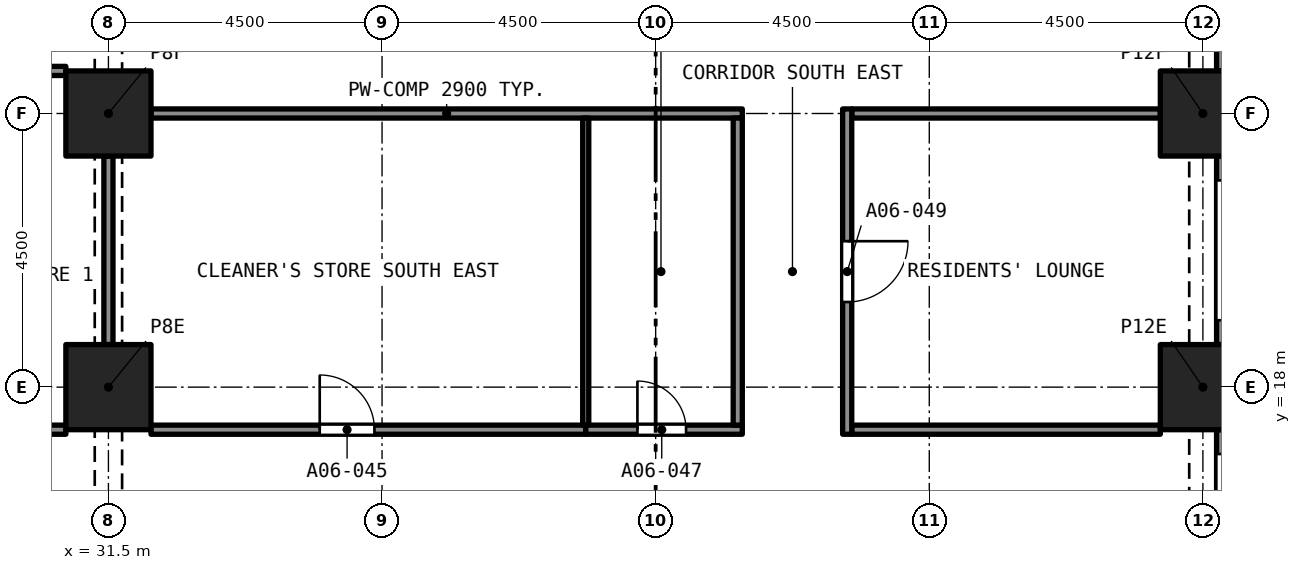
"""IFC4 building model, lengths in metres.
Left out: names, types, materials, properties, quantities, classifications, styles, units other than length and angle.
Written with IfcOpenShell. Run it as: python <this file> out.ifc"""

import sys

from ifc_helpers import new_model, si_unit, direction, frame, frame_2d, origin, origin_2d, place, context, subcontext, project, spatial, rectangle, extrude, element, fill, save


model = new_model("IFC4")
c1 = context("Model", 3, precision=1e-05, world=origin(), true_north=direction((0.0, 1.0)))
c2 = subcontext(c1, "Body", "Model", "MODEL_VIEW")
j1 = project(units=[si_unit("LENGTHUNIT", "METRE"), si_unit("PLANEANGLEUNIT", "RADIAN")], contexts=[c1])
p1 = place(None, origin())
s1 = spatial("IfcSite", under=j1, at=p1, CompositionType="ELEMENT")
p2 = place(p1, origin())
s2 = spatial("IfcBuilding", under=s1, at=p2, CompositionType="ELEMENT")
p3 = place(p2, frame((0.0, 0.0, 30.4)))
s3 = spatial("IfcBuildingStorey", under=s2, at=p3, CompositionType="ELEMENT", Elevation=30.4)
for number, where, z_axis, x_axis in (
    (1, (31.5, 18.0, 0.0), (0.0, 0.0, 1.0), (1.0, 0.0, 0.0)),
    (2, (49.5, 18.0, 0.0), (0.0, 0.0, 1.0), (1.0, 0.0, 0.0)),
    (3, (31.5, 22.5, 0.0), (0.0, 0.0, 1.0), (1.0, 0.0, 0.0)),
    (4, (49.5, 22.5, 0.0), (0.0, 0.0, 1.0), (1.0, 0.0, 0.0)),
):
    element("IfcColumn", number, at=place(p3, frame(where, z_axis=z_axis, x_axis=x_axis)), inside=s3, PredefinedType="COLUMN", context=c2, shape_type="SweptSolid", body=[
        extrude(rectangle(XDim=1.4, YDim=1.4, at=origin_2d()), origin(), (0.0, 0.0, 1.0), 3.2),
    ])
p4 = place(p3, frame((49.875, 17.3, 0.0), z_axis=(0.0, 0.0, 1.0), x_axis=(0.0, -1.0, 0.0)))
e5 = element("IfcWall", 5, at=p4, inside=s3, PredefinedType="SOLIDWALL", context=c2, shape_type="SweptSolid", body=[
    extrude(rectangle(XDim=3.1, YDim=0.3, at=frame_2d((1.55, 0.0))), origin(), (0.0, 0.0, 1.0), 3.2),
])
p5 = place(p4, frame((0.4, 0.0, 0.45)))
e6 = element("IfcOpeningElement", 6, at=p5, cuts=e5, PredefinedType="OPENING", context=c2, shape_type="SweptSolid", body=[
    extrude(rectangle(XDim=2.3, YDim=1.95, at=frame_2d((1.15, 0.975))), frame((0.0, 0.16, 0.0), z_axis=(0.0, -1.0, 0.0), x_axis=(1.0, 0.0, 0.0)), (0.0, 0.0, 1.0), 0.32),
])
p6 = place(p3, frame((49.875, 21.8, 0.0), z_axis=(0.0, 0.0, 1.0), x_axis=(0.0, -1.0, 0.0)))
e7 = element("IfcWall", 7, at=p6, inside=s3, PredefinedType="SOLIDWALL", context=c2, shape_type="SweptSolid", body=[
    extrude(rectangle(XDim=3.1, YDim=0.3, at=frame_2d((1.55, 0.0))), origin(), (0.0, 0.0, 1.0), 3.2),
])
p7 = place(p6, frame((0.4, 0.0, 0.45)))
e8 = element("IfcOpeningElement", 8, at=p7, cuts=e7, PredefinedType="OPENING", context=c2, shape_type="SweptSolid", body=[
    extrude(rectangle(XDim=2.3, YDim=1.95, at=frame_2d((1.15, 0.975))), frame((0.0, 0.16, 0.0), z_axis=(0.0, -1.0, 0.0), x_axis=(1.0, 0.0, 0.0)), (0.0, 0.0, 1.0), 0.32),
])
p8 = place(p3, frame((49.875, 26.3, 0.0), z_axis=(0.0, 0.0, 1.0), x_axis=(0.0, -1.0, 0.0)))
e9 = element("IfcWall", 9, at=p8, inside=s3, PredefinedType="SOLIDWALL", context=c2, shape_type="SweptSolid", body=[
    extrude(rectangle(XDim=3.1, YDim=0.3, at=frame_2d((1.55, 0.0))), origin(), (0.0, 0.0, 1.0), 3.2),
])
p9 = place(p8, frame((0.4, 0.0, 0.45)))
e10 = element("IfcOpeningElement", 10, at=p9, cuts=e9, PredefinedType="OPENING", context=c2, shape_type="SweptSolid", body=[
    extrude(rectangle(XDim=2.3, YDim=1.95, at=frame_2d((1.15, 0.975))), frame((0.0, 0.16, 0.0), z_axis=(0.0, -1.0, 0.0), x_axis=(1.0, 0.0, 0.0)), (0.0, 0.0, 1.0), 0.32),
])
p10 = place(p3, frame((25.725, 17.3, 0.0), z_axis=(0.0, 0.0, 1.0), x_axis=(1.0, 0.0, 0.0)))
e11 = element("IfcWall", 11, at=p10, inside=s3, PredefinedType="PARTITIONING", context=c2, shape_type="SweptSolid", body=[
    extrude(rectangle(XDim=5.075, YDim=0.15, at=frame_2d((2.538, 0.0))), origin(), (0.0, 0.0, 1.0), 2.75),
])
p11 = place(p3, frame((32.2, 17.3, 0.0), z_axis=(0.0, 0.0, 1.0), x_axis=(1.0, 0.0, 0.0)))
e12 = element("IfcWall", 12, at=p11, inside=s3, PredefinedType="PARTITIONING", context=c2, shape_type="SweptSolid", body=[
    extrude(rectangle(XDim=7.15, YDim=0.15, at=frame_2d((3.575, 0.0))), origin(), (0.0, 0.0, 1.0), 2.9),
])
p12 = place(p11, frame((2.775, 0.0, 0.0)))
e13 = element("IfcOpeningElement", 13, at=p12, cuts=e12, PredefinedType="OPENING", context=c2, shape_type="SweptSolid", body=[
    extrude(rectangle(XDim=0.9, YDim=2.1, at=frame_2d((0.45, 1.05))), frame((0.0, 0.085, 0.0), z_axis=(0.0, -1.0, 0.0), x_axis=(1.0, 0.0, 0.0)), (0.0, 0.0, 1.0), 0.17),
])
p13 = place(p3, frame((39.35, 17.3, 0.0), z_axis=(0.0, 0.0, 1.0), x_axis=(1.0, 0.0, 0.0)))
e14 = element("IfcWall", 14, at=p13, inside=s3, PredefinedType="PARTITIONING", context=c2, shape_type="SweptSolid", body=[
    extrude(rectangle(XDim=2.575, YDim=0.15, at=frame_2d((1.288, 0.0))), origin(), (0.0, 0.0, 1.0), 2.9),
])
p14 = place(p13, frame((0.85, 0.0, 0.0)))
e15 = element("IfcOpeningElement", 15, at=p14, cuts=e14, PredefinedType="OPENING", context=c2, shape_type="SweptSolid", body=[
    extrude(rectangle(XDim=0.8, YDim=2.1, at=frame_2d((0.4, 1.05))), frame((0.0, 0.085, 0.0), z_axis=(0.0, -1.0, 0.0), x_axis=(1.0, 0.0, 0.0)), (0.0, 0.0, 1.0), 0.17),
])
p15 = place(p3, frame((43.725, 17.3, 0.0), z_axis=(0.0, 0.0, 1.0), x_axis=(1.0, 0.0, 0.0)))
e16 = element("IfcWall", 16, at=p15, inside=s3, PredefinedType="PARTITIONING", context=c2, shape_type="SweptSolid", body=[
    extrude(rectangle(XDim=5.075, YDim=0.15, at=frame_2d((2.538, 0.0))), origin(), (0.0, 0.0, 1.0), 2.9),
])
p16 = place(p3, frame((25.725, 23.2, 0.0), z_axis=(0.0, 0.0, 1.0), x_axis=(1.0, 0.0, 0.0)))
e17 = element("IfcWall", 17, at=p16, inside=s3, PredefinedType="PARTITIONING", context=c2, shape_type="SweptSolid", body=[
    extrude(rectangle(XDim=5.075, YDim=0.15, at=frame_2d((2.538, 0.0))), origin(), (0.0, 0.0, 1.0), 2.75),
])
p17 = place(p3, frame((31.5, 18.7, 0.0), z_axis=(0.0, 0.0, 1.0), x_axis=(0.0, 1.0, 0.0)))
e18 = element("IfcWall", 18, at=p17, inside=s3, PredefinedType="PARTITIONING", context=c2, shape_type="SweptSolid", body=[
    extrude(rectangle(XDim=3.1, YDim=0.15, at=frame_2d((1.55, 0.0))), origin(), (0.0, 0.0, 1.0), 2.38),
])
p18 = place(p3, frame((32.2, 22.5, 0.0), z_axis=(0.0, 0.0, 1.0), x_axis=(1.0, 0.0, 0.0)))
e19 = element("IfcWall", 19, at=p18, inside=s3, PredefinedType="PARTITIONING", context=c2, shape_type="SweptSolid", body=[
    extrude(rectangle(XDim=9.725, YDim=0.15, at=frame_2d((4.863, 0.0))), origin(), (0.0, 0.0, 1.0), 2.9),
])
p19 = place(p3, frame((43.725, 22.5, 0.0), z_axis=(0.0, 0.0, 1.0), x_axis=(1.0, 0.0, 0.0)))
e20 = element("IfcWall", 20, at=p19, inside=s3, PredefinedType="PARTITIONING", context=c2, shape_type="SweptSolid", body=[
    extrude(rectangle(XDim=5.075, YDim=0.15, at=frame_2d((2.538, 0.0))), origin(), (0.0, 0.0, 1.0), 2.9),
])
p20 = place(p3, frame((41.85, 17.375, 0.0), z_axis=(0.0, 0.0, 1.0), x_axis=(0.0, 1.0, 0.0)))
e21 = element("IfcWall", 21, at=p20, inside=s3, PredefinedType="PARTITIONING", context=c2, shape_type="SweptSolid", body=[
    extrude(rectangle(XDim=5.05, YDim=0.15, at=frame_2d((2.525, 0.0))), origin(), (0.0, 0.0, 1.0), 2.9),
])
p21 = place(p3, frame((43.65, 22.575, 0.0), z_axis=(0.0, 0.0, 1.0), x_axis=(0.0, -1.0, 0.0)))
e22 = element("IfcWall", 22, at=p21, inside=s3, PredefinedType="PARTITIONING", context=c2, shape_type="SweptSolid", body=[
    extrude(rectangle(XDim=5.35, YDim=0.15, at=frame_2d((2.675, 0.0))), origin(), (0.0, 0.0, 1.0), 2.9),
])
p22 = place(p21, frame((2.175, 0.0, 0.0)))
e23 = element("IfcOpeningElement", 23, at=p22, cuts=e22, PredefinedType="OPENING", context=c2, shape_type="SweptSolid", body=[
    extrude(rectangle(XDim=1.0, YDim=2.1, at=frame_2d((0.5, 1.05))), frame((0.0, 0.085, 0.0), z_axis=(0.0, -1.0, 0.0), x_axis=(1.0, 0.0, 0.0)), (0.0, 0.0, 1.0), 0.17),
])
p23 = place(p3, frame((39.35, 17.375, 0.0), z_axis=(0.0, 0.0, 1.0), x_axis=(0.0, 1.0, 0.0)))
e24 = element("IfcWall", 24, at=p23, inside=s3, PredefinedType="PARTITIONING", context=c2, shape_type="SweptSolid", body=[
    extrude(rectangle(XDim=5.05, YDim=0.1, at=frame_2d((2.525, 0.0))), origin(), (0.0, 0.0, 1.0), 2.9),
])
p24 = place(p12, origin())
e25 = element("IfcDoor", 25, at=p24, inside=s3, OperationType="SINGLE_SWING_LEFT", PredefinedType="DOOR", context=c2, shape_type="SweptSolid", body=[
    extrude(rectangle(XDim=0.9, YDim=2.1, at=frame_2d((0.45, 1.05))), frame((0.0, 0.025, 0.0), z_axis=(0.0, -1.0, 0.0), x_axis=(1.0, 0.0, 0.0)), (0.0, 0.0, 1.0), 0.05),
])
fill(e13, e25)
p25 = place(p14, origin())
e26 = element("IfcDoor", 26, at=p25, inside=s3, OperationType="SINGLE_SWING_LEFT", PredefinedType="DOOR", context=c2, shape_type="SweptSolid", body=[
    extrude(rectangle(XDim=0.8, YDim=2.1, at=frame_2d((0.4, 1.05))), frame((0.0, 0.025, 0.0), z_axis=(0.0, -1.0, 0.0), x_axis=(1.0, 0.0, 0.0)), (0.0, 0.0, 1.0), 0.05),
])
fill(e15, e26)
p26 = place(p22, origin())
e27 = element("IfcDoor", 27, at=p26, inside=s3, OperationType="SINGLE_SWING_RIGHT", PredefinedType="DOOR", context=c2, shape_type="SweptSolid", body=[
    extrude(rectangle(XDim=1.0, YDim=2.1, at=frame_2d((0.5, 1.05))), frame((0.0, 0.025, 0.0), z_axis=(0.0, -1.0, 0.0), x_axis=(1.0, 0.0, 0.0)), (0.0, 0.0, 1.0), 0.05),
])
fill(e23, e27)
save(model, sys.argv[1])
